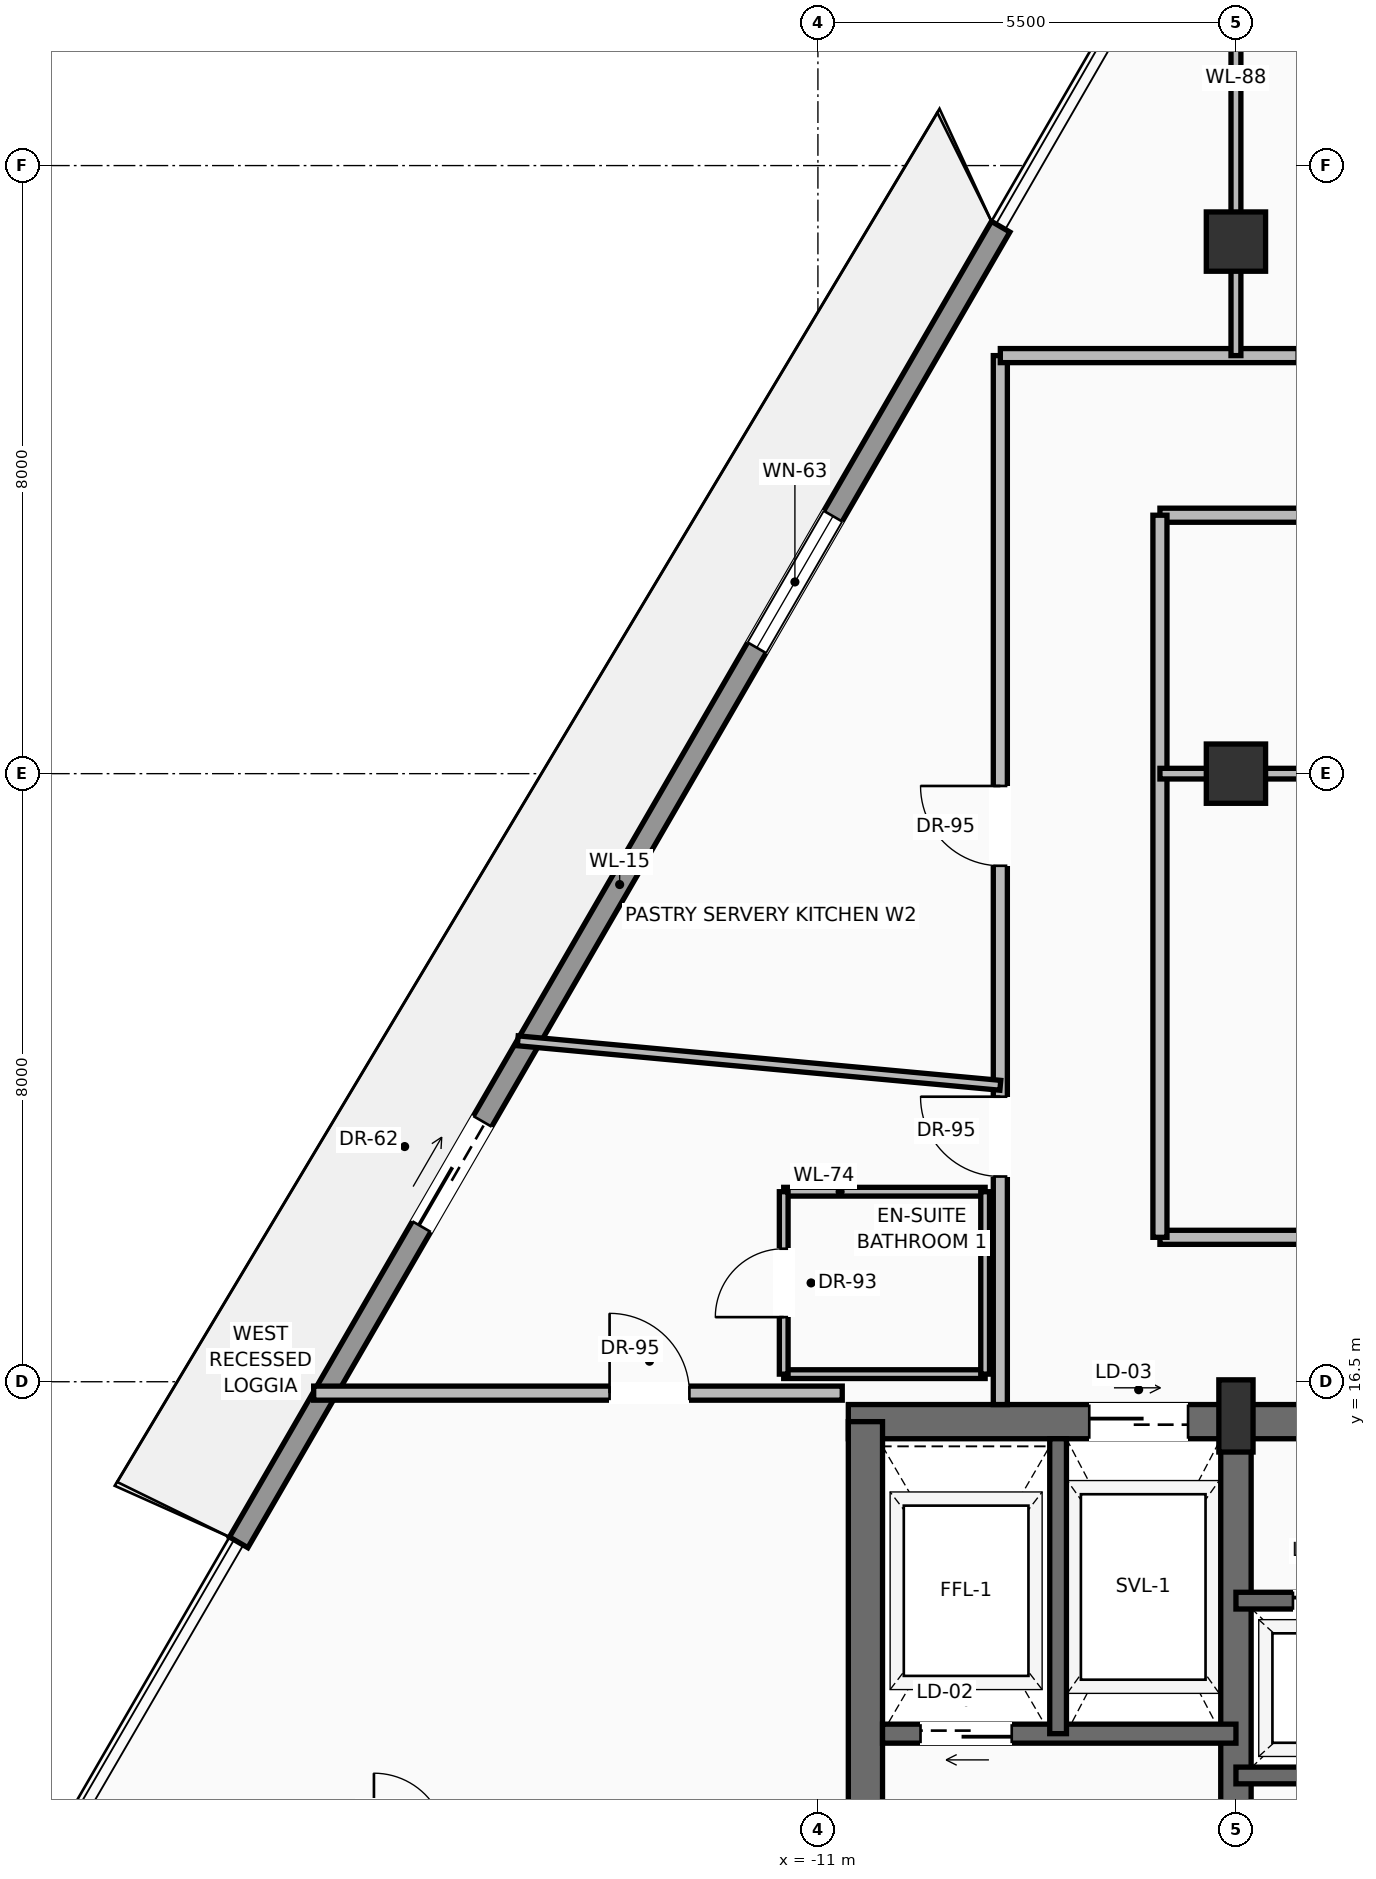
"""IFC4 building model, lengths in metres.
Left out: names, types, materials, properties, quantities, classifications, styles, units other than length and angle.
Written with IfcOpenShell. Run it as: python <this file> out.ifc"""

import sys

from ifc_helpers import new_model, si_unit, direction, frame, frame_2d, origin, origin_2d, place, context, subcontext, project, spatial, rectangle, extrude, source, transform, mapped, element, fill, save


model = new_model("IFC4")
c1 = context("Model", 3, precision=1e-05, world=origin(), true_north=direction((0.0, 1.0)))
c2 = subcontext(c1, "Body", "Model", "MODEL_VIEW")
j1 = project(units=[si_unit("LENGTHUNIT", "METRE"), si_unit("PLANEANGLEUNIT", "RADIAN")], contexts=[c1])
p1 = place(None, origin())
s1 = spatial("IfcSite", under=j1, at=p1, CompositionType="ELEMENT")
p2 = place(p1, origin())
s2 = spatial("IfcBuilding", under=s1, at=p2, CompositionType="ELEMENT")
p3 = place(p2, frame((0.0, 0.0, 269.55)))
s3 = spatial("IfcBuildingStorey", under=s2, at=p3, CompositionType="ELEMENT", Elevation=269.55)
p4 = place(p3, frame((-10.6, 15.975, 0.0), z_axis=(0.0, 0.0, 1.0), x_axis=(1.0, 0.0, 0.0)))
e1 = element("IfcWall", 1, at=p4, inside=s3, PredefinedType="SHEAR", context=c2, shape_type="SweptSolid", body=[
    extrude(rectangle(XDim=21.2, YDim=0.45, at=frame_2d((10.6, 0.0))), origin(), (0.0, 0.0, 1.0), 3.24),
])
p5 = place(p4, frame((3.17, 0.0, 0.0)))
e2 = element("IfcOpeningElement", 2, at=p5, cuts=e1, PredefinedType="OPENING", context=c2, shape_type="SweptSolid", body=[
    extrude(rectangle(XDim=1.3, YDim=2.3, at=frame_2d((0.65, 1.15))), frame((0.0, 0.235, 0.0), z_axis=(0.0, -1.0, 0.0), x_axis=(1.0, 0.0, 0.0)), (0.0, 0.0, 1.0), 0.47),
])
p6 = place(p4, frame((9.6, 0.0, 0.0)))
e3 = element("IfcOpeningElement", 3, at=p6, cuts=e1, PredefinedType="OPENING", context=c2, shape_type="SweptSolid", body=[
    extrude(rectangle(XDim=2.0, YDim=2.4, at=frame_2d((1.0, 1.2))), frame((0.0, 0.235, 0.0), z_axis=(0.0, -1.0, 0.0), x_axis=(1.0, 0.0, 0.0)), (0.0, 0.0, 1.0), 0.47),
])
p7 = place(p3, frame((-10.375, 0.625, 0.0), z_axis=(0.0, 0.0, 1.0), x_axis=(0.0, 1.0, 0.0)))
e4 = element("IfcWall", 4, at=p7, inside=s3, PredefinedType="SHEAR", context=c2, shape_type="SweptSolid", body=[
    extrude(rectangle(XDim=15.35, YDim=0.45, at=frame_2d((7.675, 0.0))), origin(), (0.0, 0.0, 1.0), 3.24),
])
p8 = place(p3, frame((-5.5, 0.625, 0.0), z_axis=(0.0, 0.0, 1.0), x_axis=(0.0, 1.0, 0.0)))
e5 = element("IfcWall", 5, at=p8, inside=s3, PredefinedType="SHEAR", context=c2, shape_type="SweptSolid", body=[
    extrude(rectangle(XDim=15.35, YDim=0.4, at=frame_2d((7.675, 0.0))), origin(), (0.0, 0.0, 1.0), 3.24),
])
p9 = place(p8, frame((8.875, 0.0, 0.0)))
e6 = element("IfcOpeningElement", 6, at=p9, cuts=e5, PredefinedType="OPENING", context=c2, shape_type="SweptSolid", body=[
    extrude(rectangle(XDim=1.1, YDim=2.2, at=frame_2d((0.55, 1.1))), frame((0.0, 0.21, 0.0), z_axis=(0.0, -1.0, 0.0), x_axis=(1.0, 0.0, 0.0)), (0.0, 0.0, 1.0), 0.42),
])
m1 = source(origin(), c2, "Body", "SweptSolid", [
    extrude(rectangle(XDim=0.45, YDim=0.95, at=origin_2d()), origin(), (0.0, 0.0, 1.0), 3.45),
])
p10 = place(p3, frame((-5.5, 16.05, 0.0), z_axis=(0.0, 0.0, 1.0), x_axis=(1.0, 0.0, 0.0)))
e7 = element("IfcColumn", 7, at=p10, inside=s3, PredefinedType="PILASTER", context=c2, shape_type="MappedRepresentation", body=[
    mapped(m1, transform((0.0, 0.0, 0.0), scale=1.0)),
])
m2 = source(origin(), c2, "Body", "SweptSolid", [
    extrude(rectangle(XDim=0.78, YDim=0.78, at=origin_2d()), origin(), (0.0, 0.0, 1.0), 3.45),
])
for number, where, z_axis, x_axis in (
    (8, (-5.5, 24.5, 0.0), (0.0, 0.0, 1.0), (1.0, 0.0, 0.0)),
    (9, (-5.5, 31.5, 0.0), (0.0, 0.0, 1.0), (1.0, 0.0, 0.0)),
):
    element("IfcColumn", number, at=place(p3, frame(where, z_axis=z_axis, x_axis=x_axis)), inside=s3, PredefinedType="COLUMN", context=c2, shape_type="MappedRepresentation", body=[
        mapped(m2, transform((0.0, 0.0, 0.0), scale=1.0)),
    ])
p11 = place(p3, frame((-18.621, 14.387, 0.0), z_axis=(0.0, 0.0, 1.0), x_axis=(0.501208020252, 0.865326828681, 0.0)))
e10 = element("IfcWall", 10, at=p11, inside=s3, PredefinedType="SOLIDWALL", context=c2, shape_type="SweptSolid", body=[
    extrude(rectangle(XDim=20.003, YDim=0.28, at=frame_2d((10.001, 0.0))), origin(), (0.0, 0.0, 1.0), 2.82),
])
p12 = place(p11, frame((4.801, 0.0, 0.0)))
e11 = element("IfcOpeningElement", 11, at=p12, cuts=e10, PredefinedType="OPENING", context=c2, shape_type="SweptSolid", body=[
    extrude(rectangle(XDim=1.6, YDim=2.35, at=frame_2d((0.8, 1.175))), frame((0.0, 0.15, 0.0), z_axis=(0.0, -1.0, 0.0), x_axis=(1.0, 0.0, 0.0)), (0.0, 0.0, 1.0), 0.3),
])
p13 = place(p11, frame((13.602, 0.0, 0.9)))
e12 = element("IfcOpeningElement", 12, at=p13, cuts=e10, PredefinedType="OPENING", context=c2, shape_type="SweptSolid", body=[
    extrude(rectangle(XDim=2.0, YDim=1.75, at=frame_2d((1.0, 0.875))), frame((0.0, 0.15, 0.0), z_axis=(0.0, -1.0, 0.0), x_axis=(1.0, 0.0, 0.0)), (0.0, 0.0, 1.0), 0.3),
])
p14 = place(p3, frame((-5.5, 11.87, 0.0), z_axis=(0.0, 0.0, 1.0), x_axis=(-1.0, 0.0, 0.0)))
e13 = element("IfcWall", 13, at=p14, inside=s3, PredefinedType="SOLIDWALL", context=c2, shape_type="SweptSolid", body=[
    extrude(rectangle(XDim=4.65, YDim=0.25, at=frame_2d((2.325, 0.0))), origin(), (0.0, 0.0, 1.0), 3.24),
])
p15 = place(p14, frame((2.95, 0.0, 0.0)))
e14 = element("IfcOpeningElement", 14, at=p15, cuts=e13, PredefinedType="OPENING", context=c2, shape_type="SweptSolid", body=[
    extrude(rectangle(XDim=1.2, YDim=2.25, at=frame_2d((0.6, 1.125))), frame((0.0, 0.135, 0.0), z_axis=(0.0, -1.0, 0.0), x_axis=(1.0, 0.0, 0.0)), (0.0, 0.0, 1.0), 0.27),
])
p16 = place(p3, frame((-7.84, 11.87, 0.0), z_axis=(0.0, 0.0, 1.0), x_axis=(0.0, 1.0, 0.0)))
e15 = element("IfcWall", 15, at=p16, inside=s3, PredefinedType="SOLIDWALL", context=c2, shape_type="SweptSolid", body=[
    extrude(rectangle(XDim=3.88, YDim=0.22, at=frame_2d((1.94, 0.0))), origin(), (0.0, 0.0, 1.0), 3.24),
])
p17 = place(p3, frame((-5.5, 11.32, 0.0), z_axis=(0.0, 0.0, 1.0), x_axis=(1.0, 0.0, 0.0)))
e16 = element("IfcWall", 16, at=p17, inside=s3, PredefinedType="SOLIDWALL", context=c2, shape_type="SweptSolid", body=[
    extrude(rectangle(XDim=7.32, YDim=0.22, at=frame_2d((3.66, 0.0))), origin(), (0.0, 0.0, 1.0), 3.24),
])
p18 = place(p3, frame((-5.5, 13.62, 0.0), z_axis=(0.0, 0.0, 1.0), x_axis=(1.0, 0.0, 0.0)))
e17 = element("IfcWall", 17, at=p18, inside=s3, PredefinedType="SOLIDWALL", context=c2, shape_type="SweptSolid", body=[
    extrude(rectangle(XDim=7.32, YDim=0.22, at=frame_2d((3.66, 0.0))), origin(), (0.0, 0.0, 1.0), 3.24),
])
p19 = place(p18, frame((0.75, 0.0, 0.0)))
e18 = element("IfcOpeningElement", 18, at=p19, cuts=e17, PredefinedType="OPENING", context=c2, shape_type="SweptSolid", body=[
    extrude(rectangle(XDim=1.1, YDim=2.2, at=frame_2d((0.55, 1.1))), frame((0.0, 0.12, 0.0), z_axis=(0.0, -1.0, 0.0), x_axis=(1.0, 0.0, 0.0)), (0.0, 0.0, 1.0), 0.24),
])
p20 = place(p18, frame((3.15, 0.0, 0.0)))
e19 = element("IfcOpeningElement", 19, at=p20, cuts=e17, PredefinedType="OPENING", context=c2, shape_type="SweptSolid", body=[
    extrude(rectangle(XDim=1.1, YDim=2.2, at=frame_2d((0.55, 1.1))), frame((0.0, 0.12, 0.0), z_axis=(0.0, -1.0, 0.0), x_axis=(1.0, 0.0, 0.0)), (0.0, 0.0, 1.0), 0.24),
])
p21 = place(p18, frame((5.55, 0.0, 0.0)))
e20 = element("IfcOpeningElement", 20, at=p21, cuts=e17, PredefinedType="OPENING", context=c2, shape_type="SweptSolid", body=[
    extrude(rectangle(XDim=1.1, YDim=2.2, at=frame_2d((0.55, 1.1))), frame((0.0, 0.12, 0.0), z_axis=(0.0, -1.0, 0.0), x_axis=(1.0, 0.0, 0.0)), (0.0, 0.0, 1.0), 0.24),
])
p22 = place(p3, frame((-6.5, 18.4, 0.0), z_axis=(0.0, 0.0, 1.0), x_axis=(1.0, 0.0, 0.0)))
e21 = element("IfcWall", 21, at=p22, inside=s3, PredefinedType="PARTITIONING", context=c2, shape_type="SweptSolid", body=[
    extrude(rectangle(XDim=12.45, YDim=0.185, at=frame_2d((6.225, 0.0))), origin(), (0.0, 0.0, 1.0), 3.232),
])
p23 = place(p22, frame((5.75, 0.0, 0.0)))
e22 = element("IfcOpeningElement", 22, at=p23, cuts=e21, PredefinedType="OPENING", context=c2, shape_type="SweptSolid", body=[
    extrude(rectangle(XDim=0.95, YDim=2.2, at=frame_2d((0.475, 1.1))), frame((0.0, 0.103, 0.0), z_axis=(0.0, -1.0, 0.0), x_axis=(1.0, 0.0, 0.0)), (0.0, 0.0, 1.0), 0.205),
])
p24 = place(p3, frame((-6.5, 27.9, 0.0), z_axis=(0.0, 0.0, 1.0), x_axis=(1.0, 0.0, 0.0)))
e23 = element("IfcWall", 23, at=p24, inside=s3, PredefinedType="PARTITIONING", context=c2, shape_type="SweptSolid", body=[
    extrude(rectangle(XDim=12.45, YDim=0.185, at=frame_2d((6.225, 0.0))), origin(), (0.0, 0.0, 1.0), 2.885),
])
p25 = place(p24, frame((5.75, 0.0, 0.0)))
e24 = element("IfcOpeningElement", 24, at=p25, cuts=e23, PredefinedType="OPENING", context=c2, shape_type="SweptSolid", body=[
    extrude(rectangle(XDim=0.95, YDim=2.2, at=frame_2d((0.475, 1.1))), frame((0.0, 0.103, 0.0), z_axis=(0.0, -1.0, 0.0), x_axis=(1.0, 0.0, 0.0)), (0.0, 0.0, 1.0), 0.205),
])
p26 = place(p3, frame((-6.5, 18.4, 0.0), z_axis=(0.0, 0.0, 1.0), x_axis=(0.0, 1.0, 0.0)))
e25 = element("IfcWall", 25, at=p26, inside=s3, PredefinedType="PARTITIONING", context=c2, shape_type="SweptSolid", body=[
    extrude(rectangle(XDim=9.5, YDim=0.185, at=frame_2d((4.75, 0.0))), origin(), (0.0, 0.0, 1.0), 3.232),
])
p27 = place(p3, frame((-8.6, 16.2, 0.0), z_axis=(0.0, 0.0, 1.0), x_axis=(0.0, 1.0, 0.0)))
e26 = element("IfcWall", 26, at=p27, inside=s3, PredefinedType="PARTITIONING", context=c2, shape_type="SweptSolid", body=[
    extrude(rectangle(XDim=13.8, YDim=0.185, at=frame_2d((6.9, 0.0))), origin(), (0.0, 0.0, 1.0), 3.232),
])
p28 = place(p27, frame((3.0, 0.0, 0.0)))
e27 = element("IfcOpeningElement", 27, at=p28, cuts=e26, PredefinedType="OPENING", context=c2, shape_type="SweptSolid", body=[
    extrude(rectangle(XDim=1.05, YDim=2.25, at=frame_2d((0.525, 1.125))), frame((0.0, 0.103, 0.0), z_axis=(0.0, -1.0, 0.0), x_axis=(1.0, 0.0, 0.0)), (0.0, 0.0, 1.0), 0.205),
])
p29 = place(p27, frame((7.088, 0.0, 0.0)))
e28 = element("IfcOpeningElement", 28, at=p29, cuts=e26, PredefinedType="OPENING", context=c2, shape_type="SweptSolid", body=[
    extrude(rectangle(XDim=1.05, YDim=2.25, at=frame_2d((0.525, 1.125))), frame((0.0, 0.103, 0.0), z_axis=(0.0, -1.0, 0.0), x_axis=(1.0, 0.0, 0.0)), (0.0, 0.0, 1.0), 0.205),
])
p30 = place(p3, frame((-8.6, 30.0, 0.0), z_axis=(0.0, 0.0, 1.0), x_axis=(1.0, 0.0, 0.0)))
e29 = element("IfcWall", 29, at=p30, inside=s3, PredefinedType="PARTITIONING", context=c2, shape_type="SweptSolid", body=[
    extrude(rectangle(XDim=16.65, YDim=0.185, at=frame_2d((8.325, 0.0))), origin(), (0.0, 0.0, 1.0), 3.232),
])
p31 = place(p30, frame((3.9, 0.0, 0.0)))
e30 = element("IfcOpeningElement", 30, at=p31, cuts=e29, PredefinedType="OPENING", context=c2, shape_type="SweptSolid", body=[
    extrude(rectangle(XDim=1.05, YDim=2.25, at=frame_2d((0.525, 1.125))), frame((0.0, 0.103, 0.0), z_axis=(0.0, -1.0, 0.0), x_axis=(1.0, 0.0, 0.0)), (0.0, 0.0, 1.0), 0.205),
])
p32 = place(p30, frame((7.8, 0.0, 0.0)))
e31 = element("IfcOpeningElement", 31, at=p32, cuts=e29, PredefinedType="OPENING", context=c2, shape_type="SweptSolid", body=[
    extrude(rectangle(XDim=1.05, YDim=2.25, at=frame_2d((0.525, 1.125))), frame((0.0, 0.103, 0.0), z_axis=(0.0, -1.0, 0.0), x_axis=(1.0, 0.0, 0.0)), (0.0, 0.0, 1.0), 0.205),
])
p33 = place(p30, frame((12.25, 0.0, 0.0)))
e32 = element("IfcOpeningElement", 32, at=p33, cuts=e29, PredefinedType="OPENING", context=c2, shape_type="SweptSolid", body=[
    extrude(rectangle(XDim=1.05, YDim=2.25, at=frame_2d((0.525, 1.125))), frame((0.0, 0.103, 0.0), z_axis=(0.0, -1.0, 0.0), x_axis=(1.0, 0.0, 0.0)), (0.0, 0.0, 1.0), 0.205),
])
p34 = place(p3, frame((-6.5, 24.5, 0.0), z_axis=(0.0, 0.0, 1.0), x_axis=(1.0, 0.0, 0.0)))
e33 = element("IfcWall", 33, at=p34, inside=s3, PredefinedType="PARTITIONING", context=c2, shape_type="SweptSolid", body=[
    extrude(rectangle(XDim=12.45, YDim=0.14, at=frame_2d((6.225, 0.0))), origin(), (0.0, 0.0, 1.0), 2.683),
])
p35 = place(p3, frame((-17.635, 16.35, 0.0), z_axis=(0.0, 0.0, 1.0), x_axis=(1.0, 0.0, 0.0)))
e34 = element("IfcWall", 34, at=p35, inside=s3, PredefinedType="PARTITIONING", context=c2, shape_type="SweptSolid", body=[
    extrude(rectangle(XDim=6.955, YDim=0.185, at=frame_2d((3.477, 0.0))), origin(), (0.0, 0.0, 1.0), 3.232),
])
p36 = place(p35, frame((3.893, 0.0, 0.0)))
e35 = element("IfcOpeningElement", 35, at=p36, cuts=e34, PredefinedType="OPENING", context=c2, shape_type="SweptSolid", body=[
    extrude(rectangle(XDim=1.05, YDim=2.25, at=frame_2d((0.525, 1.125))), frame((0.0, 0.103, 0.0), z_axis=(0.0, -1.0, 0.0), x_axis=(1.0, 0.0, 0.0)), (0.0, 0.0, 1.0), 0.205),
])
p37 = place(p3, frame((-5.5, 30.0, 0.0), z_axis=(0.0, 0.0, 1.0), x_axis=(0.0, 1.0, 0.0)))
e36 = element("IfcWall", 36, at=p37, inside=s3, PredefinedType="PARTITIONING", context=c2, shape_type="SweptSolid", body=[
    extrude(rectangle(XDim=7.3, YDim=0.13, at=frame_2d((3.65, 0.0))), origin(), (0.0, 0.0, 1.0), 2.683),
])
for number, where, z_axis, x_axis in (
    (37, (-11.45, 16.6, 0.0), (0.0, 0.0, 1.0), (1.0, 0.0, 0.0)),
    (38, (-11.45, 19.0, 0.0), (0.0, 0.0, 1.0), (1.0, 0.0, 0.0)),
):
    element("IfcWall", number, at=place(p3, frame(where, z_axis=z_axis, x_axis=x_axis)), inside=s3, PredefinedType="PARTITIONING", context=c2, shape_type="SweptSolid", body=[
        extrude(rectangle(XDim=2.65, YDim=0.115, at=frame_2d((1.325, 0.0))), origin(), (0.0, 0.0, 1.0), 3.232),
    ])
p38 = place(p3, frame((-11.45, 16.6, 0.0), z_axis=(0.0, 0.0, 1.0), x_axis=(0.0, 1.0, 0.0)))
e39 = element("IfcWall", 39, at=p38, inside=s3, PredefinedType="PARTITIONING", context=c2, shape_type="SweptSolid", body=[
    extrude(rectangle(XDim=2.4, YDim=0.115, at=frame_2d((1.2, 0.0))), origin(), (0.0, 0.0, 1.0), 3.232),
])
p39 = place(p38, frame((0.75, 0.0, 0.0)))
e40 = element("IfcOpeningElement", 40, at=p39, cuts=e39, PredefinedType="OPENING", context=c2, shape_type="SweptSolid", body=[
    extrude(rectangle(XDim=0.9, YDim=2.15, at=frame_2d((0.45, 1.075))), frame((0.0, 0.067, 0.0), z_axis=(0.0, -1.0, 0.0), x_axis=(1.0, 0.0, 0.0)), (0.0, 0.0, 1.0), 0.135),
])
p40 = place(p3, frame((-8.8, 16.6, 0.0), z_axis=(0.0, 0.0, 1.0), x_axis=(0.0, 1.0, 0.0)))
e41 = element("IfcWall", 41, at=p40, inside=s3, PredefinedType="PARTITIONING", context=c2, shape_type="SweptSolid", body=[
    extrude(rectangle(XDim=2.4, YDim=0.115, at=frame_2d((1.2, 0.0))), origin(), (0.0, 0.0, 1.0), 3.232),
])
p41 = place(p3, frame((-14.949, 20.986, 0.0), z_axis=(0.0, 0.0, 1.0), x_axis=(0.995772122892, -0.091857929817, 0.0)))
e42 = element("IfcWall", 42, at=p41, inside=s3, PredefinedType="PARTITIONING", context=c2, shape_type="SweptSolid", body=[
    extrude(rectangle(XDim=6.376, YDim=0.13, at=frame_2d((3.188, 0.0))), origin(), (0.0, 0.0, 1.0), 3.232),
])
m3 = source(origin(), c2, "Body", "SweptSolid", [
    extrude(rectangle(XDim=1.6, YDim=2.35, at=frame_2d((0.8, 1.175))), frame((0.0, 0.025, 0.0), z_axis=(0.0, -1.0, 0.0), x_axis=(1.0, 0.0, 0.0)), (0.0, 0.0, 1.0), 0.05),
])
p42 = place(p12, origin())
e43 = element("IfcDoor", 43, at=p42, inside=s3, OperationType="SLIDING_TO_LEFT", PredefinedType="DOOR", context=c2, shape_type="MappedRepresentation", body=[
    mapped(m3, transform((0.0, 0.0, 0.0), scale=1.0)),
])
fill(e11, e43)
m4 = source(origin(), c2, "Body", "SweptSolid", [
    extrude(rectangle(XDim=2.0, YDim=1.75, at=frame_2d((1.0, 0.875))), frame((0.0, 0.03, 0.0), z_axis=(0.0, -1.0, 0.0), x_axis=(1.0, 0.0, 0.0)), (0.0, 0.0, 1.0), 0.06),
])
p43 = place(p13, origin())
e44 = element("IfcWindow", 44, at=p43, inside=s3, PartitioningType="SINGLE_PANEL", PredefinedType="WINDOW", context=c2, shape_type="MappedRepresentation", body=[
    mapped(m4, transform((0.0, 0.0, 0.0), scale=1.0)),
])
fill(e12, e44)
m5 = source(origin(), c2, "Body", "SweptSolid", [
    extrude(rectangle(XDim=1.2, YDim=2.25, at=frame_2d((0.6, 1.125))), frame((0.0, 0.025, 0.0), z_axis=(0.0, -1.0, 0.0), x_axis=(1.0, 0.0, 0.0)), (0.0, 0.0, 1.0), 0.05),
])
p44 = place(p15, origin())
e45 = element("IfcDoor", 45, at=p44, inside=s3, OperationType="SLIDING_TO_LEFT", PredefinedType="DOOR", context=c2, shape_type="MappedRepresentation", body=[
    mapped(m5, transform((0.0, 0.0, 0.0), scale=1.0)),
])
fill(e14, e45)
m6 = source(origin(), c2, "Body", "SweptSolid", [
    extrude(rectangle(XDim=1.3, YDim=2.3, at=frame_2d((0.65, 1.15))), frame((0.0, 0.025, 0.0), z_axis=(0.0, -1.0, 0.0), x_axis=(1.0, 0.0, 0.0)), (0.0, 0.0, 1.0), 0.05),
])
p45 = place(p5, origin())
e46 = element("IfcDoor", 46, at=p45, inside=s3, OperationType="SLIDING_TO_RIGHT", PredefinedType="DOOR", context=c2, shape_type="MappedRepresentation", body=[
    mapped(m6, transform((0.0, 0.0, 0.0), scale=1.0)),
])
fill(e2, e46)
m7 = source(origin(), c2, "Body", "SweptSolid", [
    extrude(rectangle(XDim=1.1, YDim=2.2, at=frame_2d((0.55, 1.1))), frame((0.0, 0.025, 0.0), z_axis=(0.0, -1.0, 0.0), x_axis=(1.0, 0.0, 0.0)), (0.0, 0.0, 1.0), 0.05),
])
p46 = place(p19, origin())
e47 = element("IfcDoor", 47, at=p46, inside=s3, OperationType="SLIDING_TO_RIGHT", PredefinedType="DOOR", context=c2, shape_type="MappedRepresentation", body=[
    mapped(m7, transform((0.0, 0.0, 0.0), scale=1.0)),
])
fill(e18, e47)
m8 = source(origin(), c2, "Body", "SweptSolid", [
    extrude(rectangle(XDim=1.05, YDim=2.25, at=frame_2d((0.525, 1.125))), frame((0.0, 0.025, 0.0), z_axis=(0.0, -1.0, 0.0), x_axis=(1.0, 0.0, 0.0)), (0.0, 0.0, 1.0), 0.05),
])
p47 = place(p36, origin())
e48 = element("IfcDoor", 48, at=p47, inside=s3, OperationType="SINGLE_SWING_LEFT", PredefinedType="DOOR", context=c2, shape_type="MappedRepresentation", body=[
    mapped(m8, transform((0.0, 0.0, 0.0), scale=1.0)),
])
fill(e35, e48)
p48 = place(p28, origin())
e49 = element("IfcDoor", 49, at=p48, inside=s3, OperationType="SINGLE_SWING_RIGHT", PredefinedType="DOOR", context=c2, shape_type="MappedRepresentation", body=[
    mapped(m8, transform((0.0, 0.0, 0.0), scale=1.0)),
])
fill(e27, e49)
m9 = source(origin(), c2, "Body", "SweptSolid", [
    extrude(rectangle(XDim=0.9, YDim=2.15, at=frame_2d((0.45, 1.075))), frame((0.0, 0.025, 0.0), z_axis=(0.0, -1.0, 0.0), x_axis=(1.0, 0.0, 0.0)), (0.0, 0.0, 1.0), 0.05),
])
p49 = place(p39, origin())
e50 = element("IfcDoor", 50, at=p49, inside=s3, OperationType="SINGLE_SWING_LEFT", PredefinedType="DOOR", context=c2, shape_type="MappedRepresentation", body=[
    mapped(m9, transform((0.0, 0.0, 0.0), scale=1.0)),
])
fill(e40, e50)
p50 = place(p29, origin())
e51 = element("IfcDoor", 51, at=p50, inside=s3, OperationType="SINGLE_SWING_RIGHT", PredefinedType="DOOR", context=c2, shape_type="MappedRepresentation", body=[
    mapped(m8, transform((0.0, 0.0, 0.0), scale=1.0)),
])
fill(e28, e51)
save(model, sys.argv[1])
